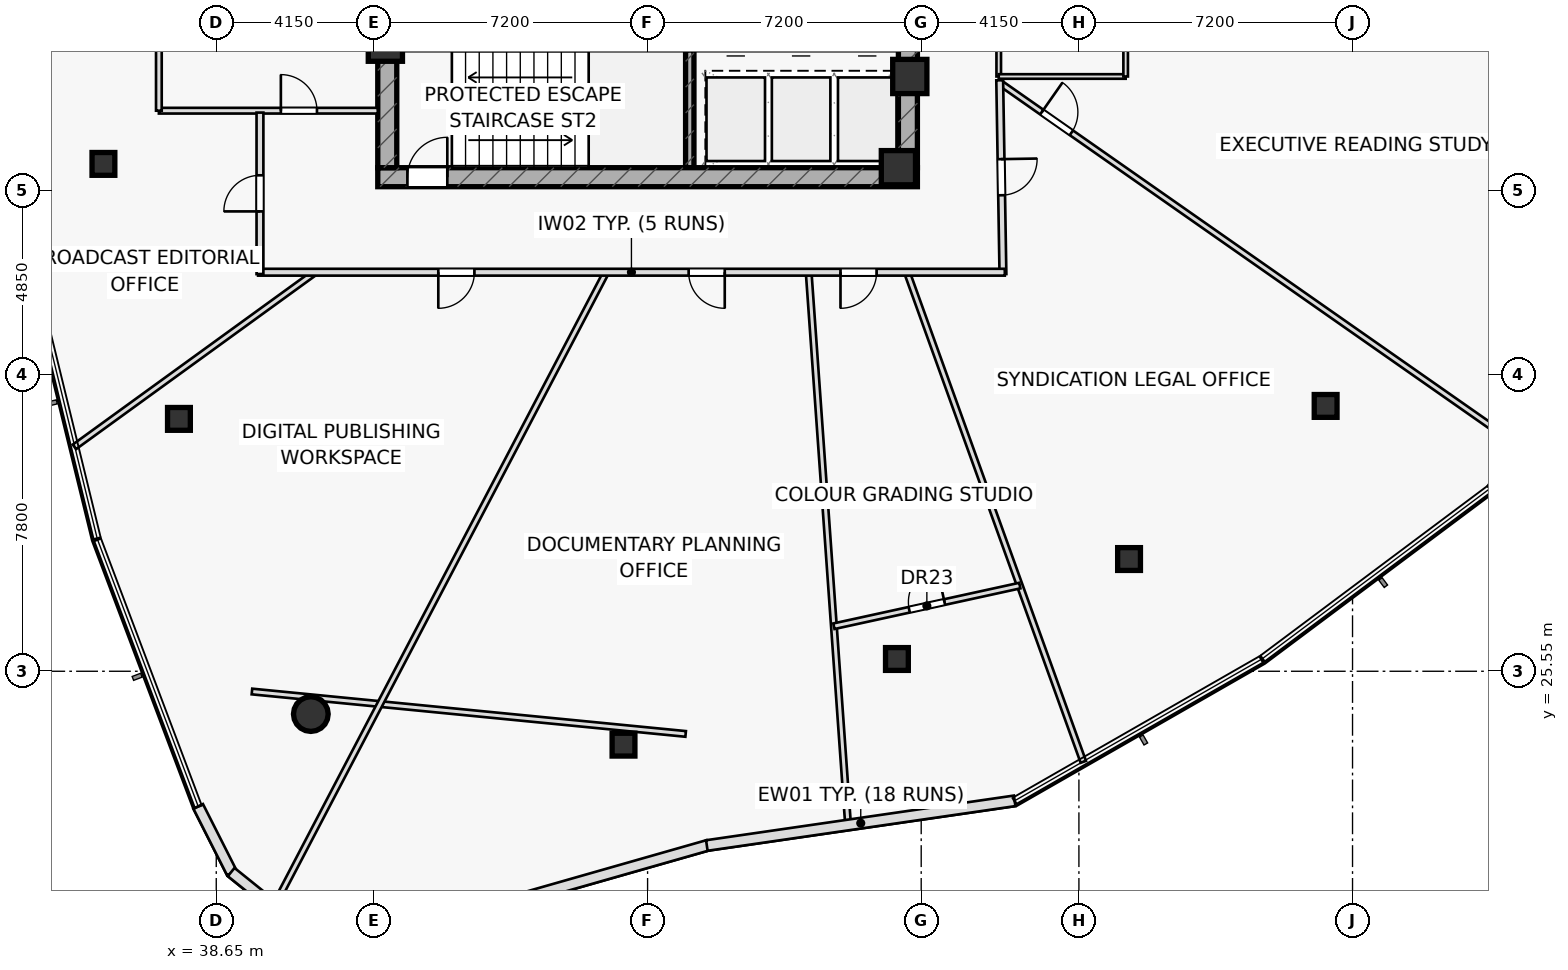
"""IFC4 building model, lengths in metres.
Left out: names, types, materials, properties, quantities, classifications, styles, units other than length and angle.
Written with IfcOpenShell. Run it as: python <this file> out.ifc"""

import sys

from ifc_helpers import new_model, si_unit, direction, frame, frame_2d, origin, origin_2d, place, context, subcontext, project, spatial, rectangle, hollow_rectangle, hollow_circle, extrude, element, fill, save


model = new_model("IFC4")
c1 = context("Model", 3, precision=1e-05, world=origin(), true_north=direction((0.0, 1.0)))
c2 = subcontext(c1, "Body", "Model", "MODEL_VIEW")
j1 = project(units=[si_unit("LENGTHUNIT", "METRE"), si_unit("PLANEANGLEUNIT", "RADIAN")], contexts=[c1])
p1 = place(None, origin())
s1 = spatial("IfcSite", under=j1, at=p1, CompositionType="ELEMENT")
p2 = place(p1, origin())
s2 = spatial("IfcBuilding", under=s1, at=p2, CompositionType="ELEMENT")
p3 = place(p2, frame((0.0, 0.0, 173.35)))
s3 = spatial("IfcBuildingStorey", under=s2, at=p3, CompositionType="ELEMENT", Elevation=173.35)
p4 = place(p3, frame((51.11, 38.8, 0.0), z_axis=(0.0, 0.0, 1.0), x_axis=(0.0, 1.0, 0.0)))
e1 = element("IfcWall", 1, at=p4, inside=s3, PredefinedType="SHEAR", context=c2, shape_type="SweptSolid", body=[
    extrude(rectangle(XDim=3.1, YDim=0.22, at=frame_2d((1.55, 0.0))), origin(), (0.0, 0.0, 1.0), 3.55),
])
p5 = place(p3, frame((42.9, 38.55, 0.0), z_axis=(0.0, 0.0, 1.0), x_axis=(1.0, 0.0, 0.0)))
e2 = element("IfcWall", 2, at=p5, inside=s3, PredefinedType="SHEAR", context=c2, shape_type="SweptSolid", body=[
    extrude(rectangle(XDim=14.2, YDim=0.5, at=frame_2d((7.1, 0.0))), origin(), (0.0, 0.0, 1.0), 3.55),
])
p6 = place(p5, frame((0.78, 0.0, 0.0)))
e3 = element("IfcOpeningElement", 3, at=p6, cuts=e2, PredefinedType="OPENING", context=c2, shape_type="SweptSolid", body=[
    extrude(rectangle(XDim=1.05, YDim=2.2, at=frame_2d((0.525, 1.1))), frame((0.0, 0.26, 0.0), z_axis=(0.0, -1.0, 0.0), x_axis=(1.0, 0.0, 0.0)), (0.0, 0.0, 1.0), 0.52),
])
p7 = place(p3, frame((43.15, 38.8, 0.0), z_axis=(0.0, 0.0, 1.0), x_axis=(0.0, 1.0, 0.0)))
e4 = element("IfcWall", 4, at=p7, inside=s3, PredefinedType="SHEAR", context=c2, shape_type="SweptSolid", body=[
    extrude(rectangle(XDim=12.4, YDim=0.5, at=frame_2d((6.2, 0.0))), origin(), (0.0, 0.0, 1.0), 3.55),
])
p8 = place(p3, frame((56.85, 38.8, 0.0), z_axis=(0.0, 0.0, 1.0), x_axis=(0.0, 1.0, 0.0)))
e5 = element("IfcWall", 5, at=p8, inside=s3, PredefinedType="SHEAR", context=c2, shape_type="SweptSolid", body=[
    extrude(rectangle(XDim=12.4, YDim=0.5, at=frame_2d((6.2, 0.0))), origin(), (0.0, 0.0, 1.0), 3.55),
])
p9 = place(p8, frame((3.85, 0.0, 0.0)))
e6 = element("IfcOpeningElement", 6, at=p9, cuts=e5, PredefinedType="OPENING", context=c2, shape_type="SweptSolid", body=[
    extrude(rectangle(XDim=1.5, YDim=2.2, at=frame_2d((0.75, 1.1))), frame((0.0, 0.26, 0.0), z_axis=(0.0, -1.0, 0.0), x_axis=(1.0, 0.0, 0.0)), (0.0, 0.0, 1.0), 0.52),
])
for number, where, z_axis, x_axis in (
    (7, (43.1, 42.05, 0.0), (0.0, 0.0, 1.0), (1.0, 0.0, 0.0)),
    (8, (56.9, 41.2, 0.0), (0.0, 0.0, 1.0), (1.0, 0.0, 0.0)),
    (9, (56.6, 38.8, 0.0), (0.0, 0.0, 1.0), (1.0, 0.0, 0.0)),
):
    element("IfcColumn", number, at=place(p3, frame(where, z_axis=z_axis, x_axis=x_axis)), inside=s3, PredefinedType="COLUMN", context=c2, shape_type="SweptSolid", body=[
        extrude(rectangle(XDim=0.9, YDim=0.9, at=origin_2d()), origin(), (0.0, 0.0, 1.0), 3.55),
    ])
for number, where, z_axis, x_axis in (
    (10, (35.681, 38.9, 0.0), (0.0, 0.0, 1.0), (1.0, 0.0, 0.0)),
    (11, (37.668, 32.19, 0.0), (0.0, 0.0, 1.0), (1.0, 0.0, 0.0)),
):
    element("IfcColumn", number, at=place(p3, frame(where, z_axis=z_axis, x_axis=x_axis)), inside=s3, PredefinedType="COLUMN", context=c2, shape_type="SweptSolid", body=[
        extrude(hollow_rectangle(XDim=0.6, YDim=0.6, WallThickness=0.036, at=origin_2d()), origin(), (0.0, 0.0, 1.0), 3.55),
    ])
p10 = place(p3, frame((41.139, 24.424, 0.0), z_axis=(0.0, 0.0, 1.0), x_axis=(1.0, 0.0, 0.0)))
e12 = element("IfcColumn", 12, at=p10, inside=s3, PredefinedType="COLUMN", context=c2, shape_type="SweptSolid", body=[
    extrude(hollow_circle(Radius=0.457, WallThickness=0.04, at=origin_2d()), origin(), (0.0, 0.0, 1.0), 3.55),
])
for number, where, z_axis, x_axis in (
    (13, (49.366, 23.619, 0.0), (0.0, 0.0, 1.0), (1.0, 0.0, 0.0)),
    (14, (56.561, 25.873, 0.0), (0.0, 0.0, 1.0), (1.0, 0.0, 0.0)),
    (15, (62.669, 28.503, 0.0), (0.0, 0.0, 1.0), (1.0, 0.0, 0.0)),
    (16, (67.842, 32.532, 0.0), (0.0, 0.0, 1.0), (1.0, 0.0, 0.0)),
):
    element("IfcColumn", number, at=place(p3, frame(where, z_axis=z_axis, x_axis=x_axis)), inside=s3, PredefinedType="COLUMN", context=c2, shape_type="SweptSolid", body=[
        extrude(hollow_rectangle(XDim=0.6, YDim=0.6, WallThickness=0.036, at=origin_2d()), origin(), (0.0, 0.0, 1.0), 3.55),
    ])
p11 = place(p3, frame((39.589, 25.018, 0.0), z_axis=(0.0, 0.0, 1.0), x_axis=(0.99524905582, -0.097361783517, 0.0)))
e17 = element("IfcWall", 17, at=p11, inside=s3, PredefinedType="PARTITIONING", context=c2, shape_type="SweptSolid", body=[
    extrude(rectangle(XDim=11.467, YDim=0.15, at=frame_2d((5.733, 0.0))), origin(), (0.0, 0.0, 1.0), 2.935),
])
p12 = place(p3, frame((37.14, 40.3, 0.0), z_axis=(0.0, 0.0, 1.0), x_axis=(1.0, 0.0, 0.0)))
e18 = element("IfcWall", 18, at=p12, inside=s3, PredefinedType="PARTITIONING", context=c2, shape_type="SweptSolid", body=[
    extrude(rectangle(XDim=5.76, YDim=0.15, at=frame_2d((2.88, 0.0))), origin(), (0.0, 0.0, 1.0), 3.55),
])
p13 = place(p12, frame((3.21, 0.0, 0.0)))
e19 = element("IfcOpeningElement", 19, at=p13, cuts=e18, PredefinedType="OPENING", context=c2, shape_type="SweptSolid", body=[
    extrude(rectangle(XDim=0.95, YDim=2.05, at=frame_2d((0.475, 1.025))), frame((0.0, 0.085, 0.0), z_axis=(0.0, -1.0, 0.0), x_axis=(1.0, 0.0, 0.0)), (0.0, 0.0, 1.0), 0.17),
])
p14 = place(p3, frame((37.14, 40.3, 0.0), z_axis=(0.0, 0.0, 1.0), x_axis=(0.0, 1.0, 0.0)))
e20 = element("IfcWall", 20, at=p14, inside=s3, PredefinedType="PARTITIONING", context=c2, shape_type="SweptSolid", body=[
    extrude(rectangle(XDim=7.58, YDim=0.15, at=frame_2d((3.79, 0.0))), origin(), (0.0, 0.0, 1.0), 2.935),
])
p15 = place(p3, frame((59.24, 41.2, 0.0), z_axis=(0.0, 0.0, 1.0), x_axis=(0.0, 1.0, 0.0)))
e21 = element("IfcWall", 21, at=p15, inside=s3, PredefinedType="PARTITIONING", context=c2, shape_type="SweptSolid", body=[
    extrude(rectangle(XDim=7.0, YDim=0.12, at=frame_2d((3.5, 0.0))), origin(), (0.0, 0.0, 1.0), 3.55),
])
p16 = place(p15, frame((1.15, 0.0, 0.0)))
e22 = element("IfcOpeningElement", 22, at=p16, cuts=e21, PredefinedType="OPENING", context=c2, shape_type="SweptSolid", body=[
    extrude(rectangle(XDim=0.9, YDim=2.05, at=frame_2d((0.45, 1.025))), frame((0.0, 0.07, 0.0), z_axis=(0.0, -1.0, 0.0), x_axis=(1.0, 0.0, 0.0)), (0.0, 0.0, 1.0), 0.14),
])
p17 = place(p15, frame((4.7, 0.0, 0.0)))
e23 = element("IfcOpeningElement", 23, at=p17, cuts=e21, PredefinedType="OPENING", context=c2, shape_type="SweptSolid", body=[
    extrude(rectangle(XDim=0.9, YDim=2.05, at=frame_2d((0.45, 1.025))), frame((0.0, 0.07, 0.0), z_axis=(0.0, -1.0, 0.0), x_axis=(1.0, 0.0, 0.0)), (0.0, 0.0, 1.0), 0.14),
])
p18 = place(p3, frame((59.24, 41.2, 0.0), z_axis=(0.0, 0.0, 1.0), x_axis=(1.0, 0.0, 0.0)))
e24 = element("IfcWall", 24, at=p18, inside=s3, PredefinedType="PARTITIONING", context=c2, shape_type="SweptSolid", body=[
    extrude(rectangle(XDim=3.34, YDim=0.12, at=frame_2d((1.67, 0.0))), origin(), (0.0, 0.0, 1.0), 3.55),
])
p19 = place(p3, frame((62.58, 41.2, 0.0), z_axis=(0.0, 0.0, 1.0), x_axis=(0.0, 1.0, 0.0)))
e25 = element("IfcWall", 25, at=p19, inside=s3, PredefinedType="PARTITIONING", context=c2, shape_type="SweptSolid", body=[
    extrude(rectangle(XDim=7.0, YDim=0.12, at=frame_2d((3.5, 0.0))), origin(), (0.0, 0.0, 1.0), 3.55),
])
p20 = place(p3, frame((41.256, 36.05, 0.0), z_axis=(0.0, 0.0, 1.0), x_axis=(-0.80959562295, -0.586988012911, 0.0)))
e26 = element("IfcWall", 26, at=p20, inside=s3, PredefinedType="PARTITIONING", context=c2, shape_type="SweptSolid", body=[
    extrude(rectangle(XDim=7.828, YDim=0.15, at=frame_2d((3.914, 0.0))), origin(), (0.0, 0.0, 1.0), 2.935),
])
p21 = place(p3, frame((48.911, 36.05, 0.0), z_axis=(0.0, 0.0, 1.0), x_axis=(-0.46406264492, -0.885802382922, 0.0)))
e27 = element("IfcWall", 27, at=p21, inside=s3, PredefinedType="PARTITIONING", context=c2, shape_type="SweptSolid", body=[
    extrude(rectangle(XDim=18.852, YDim=0.15, at=frame_2d((9.426, 0.0))), origin(), (0.0, 0.0, 1.0), 2.935),
])
p22 = place(p3, frame((54.238, 36.05, 0.0), z_axis=(0.0, 0.0, 1.0), x_axis=(0.071156685637, -0.997465150313, 0.0)))
e28 = element("IfcWall", 28, at=p22, inside=s3, PredefinedType="PARTITIONING", context=c2, shape_type="SweptSolid", body=[
    extrude(rectangle(XDim=14.592, YDim=0.15, at=frame_2d((7.296, 0.0))), origin(), (0.0, 0.0, 1.0), 3.025),
])
p23 = place(p3, frame((56.824, 36.05, 0.0), z_axis=(0.0, 0.0, 1.0), x_axis=(0.338931579685, -0.940811024751, 0.0)))
e29 = element("IfcWall", 29, at=p23, inside=s3, PredefinedType="PARTITIONING", context=c2, shape_type="SweptSolid", body=[
    extrude(rectangle(XDim=13.694, YDim=0.15, at=frame_2d((6.847, 0.0))), origin(), (0.0, 0.0, 1.0), 2.935),
])
p24 = place(p3, frame((59.267, 41.037, 0.0), z_axis=(0.0, 0.0, 1.0), x_axis=(0.81945399116, -0.573144969769, 0.0)))
e30 = element("IfcWall", 30, at=p24, inside=s3, PredefinedType="PARTITIONING", context=c2, shape_type="SweptSolid", body=[
    extrude(rectangle(XDim=16.626, YDim=0.15, at=frame_2d((8.313, 0.0))), origin(), (0.0, 0.0, 1.0), 2.935),
])
p25 = place(p24, frame((1.35, 0.0, 0.0)))
e31 = element("IfcOpeningElement", 31, at=p25, cuts=e30, PredefinedType="OPENING", context=c2, shape_type="SweptSolid", body=[
    extrude(rectangle(XDim=0.95, YDim=2.05, at=frame_2d((0.475, 1.025))), frame((0.0, 0.085, 0.0), z_axis=(0.0, -1.0, 0.0), x_axis=(1.0, 0.0, 0.0)), (0.0, 0.0, 1.0), 0.17),
])
p26 = place(p3, frame((54.903, 26.735, 0.0), z_axis=(0.0, 0.0, 1.0), x_axis=(0.976913373729, 0.213635812141, 0.0)))
e32 = element("IfcWall", 32, at=p26, inside=s3, PredefinedType="PARTITIONING", context=c2, shape_type="SweptSolid", body=[
    extrude(rectangle(XDim=5.008, YDim=0.15, at=frame_2d((2.504, 0.0))), origin(), (0.0, 0.0, 1.0), 2.935),
])
p27 = place(p26, frame((2.029, 0.0, 0.0)))
e33 = element("IfcOpeningElement", 33, at=p27, cuts=e32, PredefinedType="OPENING", context=c2, shape_type="SweptSolid", body=[
    extrude(rectangle(XDim=0.95, YDim=2.05, at=frame_2d((0.475, 1.025))), frame((0.0, 0.085, 0.0), z_axis=(0.0, -1.0, 0.0), x_axis=(1.0, 0.0, 0.0)), (0.0, 0.0, 1.0), 0.17),
])
p28 = place(p3, frame((59.266, 41.1, 0.0), z_axis=(0.0, 0.0, 1.0), x_axis=(0.016656377357, -0.999861272924, 0.0)))
e34 = element("IfcWall", 34, at=p28, inside=s3, PredefinedType="PARTITIONING", context=c2, shape_type="SweptSolid", body=[
    extrude(rectangle(XDim=5.101, YDim=0.18, at=frame_2d((2.55, 0.0))), origin(), (0.0, 0.0, 1.0), 2.935),
])
p29 = place(p28, frame((2.075, 0.0, 0.0)))
e35 = element("IfcOpeningElement", 35, at=p29, cuts=e34, PredefinedType="OPENING", context=c2, shape_type="SweptSolid", body=[
    extrude(rectangle(XDim=0.95, YDim=2.05, at=frame_2d((0.475, 1.025))), frame((0.0, 0.1, 0.0), z_axis=(0.0, -1.0, 0.0), x_axis=(1.0, 0.0, 0.0)), (0.0, 0.0, 1.0), 0.2),
])
p30 = place(p3, frame((59.4, 36.05, 0.0), z_axis=(0.0, 0.0, 1.0), x_axis=(-1.0, 0.0, 0.0)))
e36 = element("IfcWall", 36, at=p30, inside=s3, PredefinedType="PARTITIONING", context=c2, shape_type="SweptSolid", body=[
    extrude(rectangle(XDim=19.65, YDim=0.18, at=frame_2d((9.825, 0.0))), origin(), (0.0, 0.0, 1.0), 2.935),
])
p31 = place(p30, frame((3.374, 0.0, 0.0)))
e37 = element("IfcOpeningElement", 37, at=p31, cuts=e36, PredefinedType="OPENING", context=c2, shape_type="SweptSolid", body=[
    extrude(rectangle(XDim=0.95, YDim=2.05, at=frame_2d((0.475, 1.025))), frame((0.0, 0.1, 0.0), z_axis=(0.0, -1.0, 0.0), x_axis=(1.0, 0.0, 0.0)), (0.0, 0.0, 1.0), 0.2),
])
p32 = place(p30, frame((7.369, 0.0, 0.0)))
e38 = element("IfcOpeningElement", 38, at=p32, cuts=e36, PredefinedType="OPENING", context=c2, shape_type="SweptSolid", body=[
    extrude(rectangle(XDim=0.95, YDim=2.05, at=frame_2d((0.475, 1.025))), frame((0.0, 0.1, 0.0), z_axis=(0.0, -1.0, 0.0), x_axis=(1.0, 0.0, 0.0)), (0.0, 0.0, 1.0), 0.2),
])
p33 = place(p30, frame((13.957, 0.0, 0.0)))
e39 = element("IfcOpeningElement", 39, at=p33, cuts=e36, PredefinedType="OPENING", context=c2, shape_type="SweptSolid", body=[
    extrude(rectangle(XDim=0.95, YDim=2.05, at=frame_2d((0.475, 1.025))), frame((0.0, 0.1, 0.0), z_axis=(0.0, -1.0, 0.0), x_axis=(1.0, 0.0, 0.0)), (0.0, 0.0, 1.0), 0.2),
])
p34 = place(p3, frame((39.8, 36.0, 0.0), z_axis=(0.0, 0.0, 1.0), x_axis=(0.0, 1.0, 0.0)))
e40 = element("IfcWall", 40, at=p34, inside=s3, PredefinedType="PARTITIONING", context=c2, shape_type="SweptSolid", body=[
    extrude(rectangle(XDim=4.25, YDim=0.18, at=frame_2d((2.125, 0.0))), origin(), (0.0, 0.0, 1.0), 2.935),
])
p35 = place(p34, frame((1.65, 0.0, 0.0)))
e41 = element("IfcOpeningElement", 41, at=p35, cuts=e40, PredefinedType="OPENING", context=c2, shape_type="SweptSolid", body=[
    extrude(rectangle(XDim=0.95, YDim=2.05, at=frame_2d((0.475, 1.025))), frame((0.0, 0.1, 0.0), z_axis=(0.0, -1.0, 0.0), x_axis=(1.0, 0.0, 0.0)), (0.0, 0.0, 1.0), 0.2),
])
p36 = place(p3, frame((38.175, 21.994, 0.0), z_axis=(0.0, 0.0, 1.0), x_axis=(0.451588479139, -0.892226342084, 0.0)))
e42 = element("IfcWall", 42, at=p36, inside=s3, PredefinedType="STANDARD", context=c2, shape_type="SweptSolid", body=[
    extrude(rectangle(XDim=1.962, YDim=0.28, at=frame_2d((0.981, 0.0))), origin(), (0.0, 0.0, 1.0), 3.55),
])
p37 = place(p3, frame((39.042, 20.266, 0.0), z_axis=(0.0, 0.0, 1.0), x_axis=(0.778775993183, -0.627302122141, 0.0)))
e43 = element("IfcWall", 43, at=p37, inside=s3, PredefinedType="STANDARD", context=c2, shape_type="SweptSolid", body=[
    extrude(rectangle(XDim=1.95, YDim=0.28, at=frame_2d((0.975, 0.0))), origin(), (0.0, 0.0, 1.0), 3.55),
])
p38 = place(p3, frame((44.309, 18.895, 0.0), z_axis=(0.0, 0.0, 1.0), x_axis=(0.961638261427, 0.274320714055, 0.0)))
e44 = element("IfcWall", 44, at=p38, inside=s3, PredefinedType="STANDARD", context=c2, shape_type="SweptSolid", body=[
    extrude(rectangle(XDim=7.57, YDim=0.28, at=frame_2d((3.785, 0.0))), origin(), (0.0, 0.0, 1.0), 3.55),
])
p39 = place(p3, frame((51.559, 20.966, 0.0), z_axis=(0.0, 0.0, 1.0), x_axis=(0.989637514737, 0.143588263538, 0.0)))
e45 = element("IfcWall", 45, at=p39, inside=s3, PredefinedType="STANDARD", context=c2, shape_type="SweptSolid", body=[
    extrude(rectangle(XDim=8.185, YDim=0.28, at=frame_2d((4.093, 0.0))), origin(), (0.0, 0.0, 1.0), 3.55),
])
p40 = place(p6, origin())
e46 = element("IfcDoor", 46, at=p40, inside=s3, OperationType="SINGLE_SWING_RIGHT", PredefinedType="DOOR", context=c2, shape_type="SweptSolid", body=[
    extrude(rectangle(XDim=1.05, YDim=2.2, at=frame_2d((0.525, 1.1))), frame((0.0, 0.025, 0.0), z_axis=(0.0, -1.0, 0.0), x_axis=(1.0, 0.0, 0.0)), (0.0, 0.0, 1.0), 0.05),
])
fill(e3, e46)
p41 = place(p13, origin())
e47 = element("IfcDoor", 47, at=p41, inside=s3, OperationType="SINGLE_SWING_LEFT", PredefinedType="DOOR", context=c2, shape_type="SweptSolid", body=[
    extrude(rectangle(XDim=0.95, YDim=2.05, at=frame_2d((0.475, 1.025))), frame((0.0, 0.025, 0.0), z_axis=(0.0, -1.0, 0.0), x_axis=(1.0, 0.0, 0.0)), (0.0, 0.0, 1.0), 0.05),
])
fill(e19, e47)
p42 = place(p25, origin())
e48 = element("IfcDoor", 48, at=p42, inside=s3, OperationType="SINGLE_SWING_LEFT", PredefinedType="DOOR", context=c2, shape_type="SweptSolid", body=[
    extrude(rectangle(XDim=0.95, YDim=2.05, at=frame_2d((0.475, 1.025))), frame((0.0, 0.025, 0.0), z_axis=(0.0, -1.0, 0.0), x_axis=(1.0, 0.0, 0.0)), (0.0, 0.0, 1.0), 0.05),
])
fill(e31, e48)
p43 = place(p27, origin())
e49 = element("IfcDoor", 49, at=p43, inside=s3, OperationType="SINGLE_SWING_RIGHT", PredefinedType="DOOR", context=c2, shape_type="SweptSolid", body=[
    extrude(rectangle(XDim=0.95, YDim=2.05, at=frame_2d((0.475, 1.025))), frame((0.0, 0.025, 0.0), z_axis=(0.0, -1.0, 0.0), x_axis=(1.0, 0.0, 0.0)), (0.0, 0.0, 1.0), 0.05),
])
fill(e33, e49)
p44 = place(p29, origin())
e50 = element("IfcDoor", 50, at=p44, inside=s3, OperationType="SINGLE_SWING_LEFT", PredefinedType="DOOR", context=c2, shape_type="SweptSolid", body=[
    extrude(rectangle(XDim=0.95, YDim=2.05, at=frame_2d((0.475, 1.025))), frame((0.0, 0.025, 0.0), z_axis=(0.0, -1.0, 0.0), x_axis=(1.0, 0.0, 0.0)), (0.0, 0.0, 1.0), 0.05),
])
fill(e35, e50)
p45 = place(p31, origin())
e51 = element("IfcDoor", 51, at=p45, inside=s3, OperationType="SINGLE_SWING_RIGHT", PredefinedType="DOOR", context=c2, shape_type="SweptSolid", body=[
    extrude(rectangle(XDim=0.95, YDim=2.05, at=frame_2d((0.475, 1.025))), frame((0.0, 0.025, 0.0), z_axis=(0.0, -1.0, 0.0), x_axis=(1.0, 0.0, 0.0)), (0.0, 0.0, 1.0), 0.05),
])
fill(e37, e51)
p46 = place(p32, origin())
e52 = element("IfcDoor", 52, at=p46, inside=s3, OperationType="SINGLE_SWING_LEFT", PredefinedType="DOOR", context=c2, shape_type="SweptSolid", body=[
    extrude(rectangle(XDim=0.95, YDim=2.05, at=frame_2d((0.475, 1.025))), frame((0.0, 0.025, 0.0), z_axis=(0.0, -1.0, 0.0), x_axis=(1.0, 0.0, 0.0)), (0.0, 0.0, 1.0), 0.05),
])
fill(e38, e52)
p47 = place(p33, origin())
e53 = element("IfcDoor", 53, at=p47, inside=s3, OperationType="SINGLE_SWING_RIGHT", PredefinedType="DOOR", context=c2, shape_type="SweptSolid", body=[
    extrude(rectangle(XDim=0.95, YDim=2.05, at=frame_2d((0.475, 1.025))), frame((0.0, 0.025, 0.0), z_axis=(0.0, -1.0, 0.0), x_axis=(1.0, 0.0, 0.0)), (0.0, 0.0, 1.0), 0.05),
])
fill(e39, e53)
p48 = place(p35, origin())
e54 = element("IfcDoor", 54, at=p48, inside=s3, OperationType="SINGLE_SWING_LEFT", PredefinedType="DOOR", context=c2, shape_type="SweptSolid", body=[
    extrude(rectangle(XDim=0.95, YDim=2.05, at=frame_2d((0.475, 1.025))), frame((0.0, 0.025, 0.0), z_axis=(0.0, -1.0, 0.0), x_axis=(1.0, 0.0, 0.0)), (0.0, 0.0, 1.0), 0.05),
])
fill(e41, e54)
save(model, sys.argv[1])
